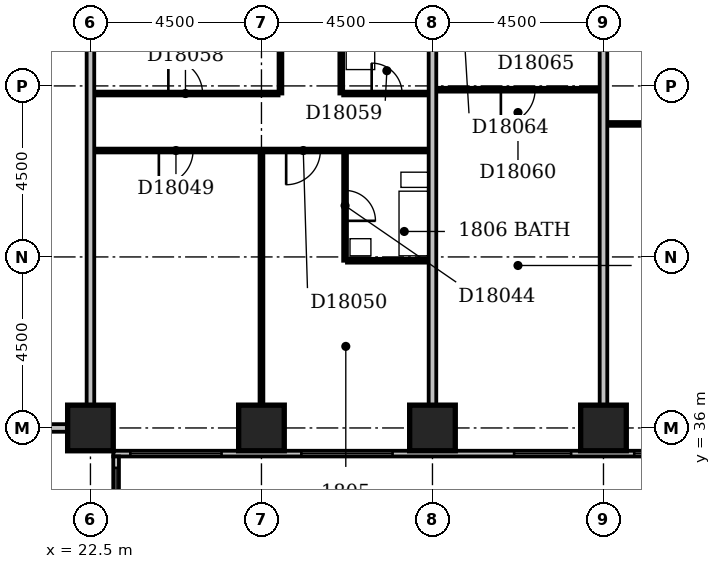
"""IFC4 building model, lengths in metres.
Left out: names, types, materials, properties, quantities, classifications, styles, units other than length and angle.
Written with IfcOpenShell. Run it as: python <this file> out.ifc"""

import sys

from ifc_helpers import new_model, si_unit, direction, frame, frame_2d, origin, origin_2d, place, context, subcontext, project, spatial, rectangle, extrude, element, fill, save


model = new_model("IFC4")
c1 = context("Model", 3, precision=1e-05, world=origin(), true_north=direction((0.0, 1.0)))
c2 = subcontext(c1, "Body", "Model", "MODEL_VIEW")
j1 = project(units=[si_unit("LENGTHUNIT", "METRE"), si_unit("PLANEANGLEUNIT", "RADIAN")], contexts=[c1])
p1 = place(None, origin())
s1 = spatial("IfcSite", under=j1, at=p1, CompositionType="ELEMENT")
p2 = place(p1, origin())
s2 = spatial("IfcBuilding", under=s1, at=p2, CompositionType="ELEMENT")
p3 = place(p2, frame((0.0, 0.0, 75.8)))
s3 = spatial("IfcBuildingStorey", under=s2, at=p3, CompositionType="ELEMENT", Elevation=75.8)
for number, where, z_axis, x_axis in (
    (1, (22.5, 36.0, -0.3), (0.0, 0.0, 1.0), (1.0, 0.0, 0.0)),
    (2, (27.0, 36.0, -0.3), (0.0, 0.0, 1.0), (1.0, 0.0, 0.0)),
    (3, (31.5, 36.0, -0.3), (0.0, 0.0, 1.0), (1.0, 0.0, 0.0)),
    (4, (36.0, 36.0, -0.3), (0.0, 0.0, 1.0), (1.0, 0.0, 0.0)),
):
    element("IfcColumn", number, at=place(p3, frame(where, z_axis=z_axis, x_axis=x_axis)), inside=s3, PredefinedType="COLUMN", context=c2, shape_type="SweptSolid", body=[
        extrude(rectangle(XDim=1.2, YDim=1.2, at=origin_2d()), origin(), (0.0, 0.0, 1.0), 3.6),
    ])
p4 = place(p3, frame((23.175, 17.4, 0.0), z_axis=(0.0, 0.0, 1.0), x_axis=(0.0, 1.0, 0.0)))
e5 = element("IfcWall", 5, at=p4, inside=s3, PredefinedType="STANDARD", context=c2, shape_type="SweptSolid", body=[
    extrude(rectangle(XDim=17.85, YDim=0.15, at=frame_2d((8.925, 0.0))), origin(), (0.0, 0.0, 1.0), 2.7),
])
p5 = place(p4, frame((1.65, 0.0, 0.6)))
e6 = element("IfcOpeningElement", 6, at=p5, cuts=e5, PredefinedType="OPENING", context=c2, shape_type="SweptSolid", body=[
    extrude(rectangle(XDim=2.4, YDim=1.8, at=frame_2d((1.2, 0.9))), frame((0.0, 0.087, 0.0), z_axis=(0.0, -1.0, 0.0), x_axis=(1.0, 0.0, 0.0)), (0.0, 0.0, 1.0), 0.174),
])
p6 = place(p4, frame((6.15, 0.0, 0.6)))
e7 = element("IfcOpeningElement", 7, at=p6, cuts=e5, PredefinedType="OPENING", context=c2, shape_type="SweptSolid", body=[
    extrude(rectangle(XDim=2.4, YDim=1.8, at=frame_2d((1.2, 0.9))), frame((0.0, 0.087, 0.0), z_axis=(0.0, -1.0, 0.0), x_axis=(1.0, 0.0, 0.0)), (0.0, 0.0, 1.0), 0.174),
])
p7 = place(p4, frame((10.483, 0.0, 0.6)))
e8 = element("IfcOpeningElement", 8, at=p7, cuts=e5, PredefinedType="OPENING", context=c2, shape_type="SweptSolid", body=[
    extrude(rectangle(XDim=1.5, YDim=1.8, at=frame_2d((0.75, 0.9))), frame((0.0, 0.087, 0.0), z_axis=(0.0, -1.0, 0.0), x_axis=(1.0, 0.0, 0.0)), (0.0, 0.0, 1.0), 0.174),
])
p8 = place(p4, frame((15.15, 0.0, 0.6)))
e9 = element("IfcOpeningElement", 9, at=p8, cuts=e5, PredefinedType="OPENING", context=c2, shape_type="SweptSolid", body=[
    extrude(rectangle(XDim=2.4, YDim=1.8, at=frame_2d((1.2, 0.9))), frame((0.0, 0.087, 0.0), z_axis=(0.0, -1.0, 0.0), x_axis=(1.0, 0.0, 0.0)), (0.0, 0.0, 1.0), 0.174),
])
p9 = place(p3, frame((23.1, 35.325, 0.0), z_axis=(0.0, 0.0, 1.0), x_axis=(1.0, 0.0, 0.0)))
e10 = element("IfcWall", 10, at=p9, inside=s3, PredefinedType="STANDARD", context=c2, shape_type="SweptSolid", body=[
    extrude(rectangle(XDim=45.15, YDim=0.15, at=frame_2d((22.575, 0.0))), origin(), (0.0, 0.0, 1.0), 2.7),
])
p10 = place(p9, frame((0.45, 0.0, 0.6)))
e11 = element("IfcOpeningElement", 11, at=p10, cuts=e10, PredefinedType="OPENING", context=c2, shape_type="SweptSolid", body=[
    extrude(rectangle(XDim=2.4, YDim=1.8, at=frame_2d((1.2, 0.9))), frame((0.0, 0.087, 0.0), z_axis=(0.0, -1.0, 0.0), x_axis=(1.0, 0.0, 0.0)), (0.0, 0.0, 1.0), 0.174),
])
p11 = place(p9, frame((4.95, 0.0, 0.6)))
e12 = element("IfcOpeningElement", 12, at=p11, cuts=e10, PredefinedType="OPENING", context=c2, shape_type="SweptSolid", body=[
    extrude(rectangle(XDim=2.4, YDim=1.8, at=frame_2d((1.2, 0.9))), frame((0.0, 0.087, 0.0), z_axis=(0.0, -1.0, 0.0), x_axis=(1.0, 0.0, 0.0)), (0.0, 0.0, 1.0), 0.174),
])
p12 = place(p9, frame((10.548, 0.0, 0.6)))
e13 = element("IfcOpeningElement", 13, at=p12, cuts=e10, PredefinedType="OPENING", context=c2, shape_type="SweptSolid", body=[
    extrude(rectangle(XDim=1.5, YDim=1.8, at=frame_2d((0.75, 0.9))), frame((0.0, 0.087, 0.0), z_axis=(0.0, -1.0, 0.0), x_axis=(1.0, 0.0, 0.0)), (0.0, 0.0, 1.0), 0.174),
])
p13 = place(p9, frame((13.71, 0.0, 0.6)))
e14 = element("IfcOpeningElement", 14, at=p13, cuts=e10, PredefinedType="OPENING", context=c2, shape_type="SweptSolid", body=[
    extrude(rectangle(XDim=1.8, YDim=1.8, at=frame_2d((0.9, 0.9))), frame((0.0, 0.087, 0.0), z_axis=(0.0, -1.0, 0.0), x_axis=(1.0, 0.0, 0.0)), (0.0, 0.0, 1.0), 0.174),
])
p14 = place(p9, frame((18.45, 0.0, 0.6)))
e15 = element("IfcOpeningElement", 15, at=p14, cuts=e10, PredefinedType="OPENING", context=c2, shape_type="SweptSolid", body=[
    extrude(rectangle(XDim=2.4, YDim=1.8, at=frame_2d((1.2, 0.9))), frame((0.0, 0.087, 0.0), z_axis=(0.0, -1.0, 0.0), x_axis=(1.0, 0.0, 0.0)), (0.0, 0.0, 1.0), 0.174),
])
p15 = place(p9, frame((22.95, 0.0, 0.6)))
e16 = element("IfcOpeningElement", 16, at=p15, cuts=e10, PredefinedType="OPENING", context=c2, shape_type="SweptSolid", body=[
    extrude(rectangle(XDim=2.4, YDim=1.8, at=frame_2d((1.2, 0.9))), frame((0.0, 0.087, 0.0), z_axis=(0.0, -1.0, 0.0), x_axis=(1.0, 0.0, 0.0)), (0.0, 0.0, 1.0), 0.174),
])
p16 = place(p9, frame((27.45, 0.0, 0.6)))
e17 = element("IfcOpeningElement", 17, at=p16, cuts=e10, PredefinedType="OPENING", context=c2, shape_type="SweptSolid", body=[
    extrude(rectangle(XDim=2.4, YDim=1.8, at=frame_2d((1.2, 0.9))), frame((0.0, 0.087, 0.0), z_axis=(0.0, -1.0, 0.0), x_axis=(1.0, 0.0, 0.0)), (0.0, 0.0, 1.0), 0.174),
])
p17 = place(p9, frame((31.95, 0.0, 0.6)))
e18 = element("IfcOpeningElement", 18, at=p17, cuts=e10, PredefinedType="OPENING", context=c2, shape_type="SweptSolid", body=[
    extrude(rectangle(XDim=2.4, YDim=1.8, at=frame_2d((1.2, 0.9))), frame((0.0, 0.087, 0.0), z_axis=(0.0, -1.0, 0.0), x_axis=(1.0, 0.0, 0.0)), (0.0, 0.0, 1.0), 0.174),
])
p18 = place(p9, frame((36.331, 0.0, 0.6)))
e19 = element("IfcOpeningElement", 19, at=p18, cuts=e10, PredefinedType="OPENING", context=c2, shape_type="SweptSolid", body=[
    extrude(rectangle(XDim=2.1, YDim=1.8, at=frame_2d((1.05, 0.9))), frame((0.0, 0.087, 0.0), z_axis=(0.0, -1.0, 0.0), x_axis=(1.0, 0.0, 0.0)), (0.0, 0.0, 1.0), 0.174),
])
p19 = place(p9, frame((40.95, 0.0, 0.6)))
e20 = element("IfcOpeningElement", 20, at=p19, cuts=e10, PredefinedType="OPENING", context=c2, shape_type="SweptSolid", body=[
    extrude(rectangle(XDim=2.4, YDim=1.8, at=frame_2d((1.2, 0.9))), frame((0.0, 0.087, 0.0), z_axis=(0.0, -1.0, 0.0), x_axis=(1.0, 0.0, 0.0)), (0.0, 0.0, 1.0), 0.174),
])
p20 = place(p3, frame((9.1, 36.0, 0.0), z_axis=(0.0, 0.0, 1.0), x_axis=(1.0, 0.0, 0.0)))
e21 = element("IfcWall", 21, at=p20, inside=s3, PredefinedType="PARTITIONING", context=c2, shape_type="SweptSolid", body=[
    extrude(rectangle(XDim=12.8, YDim=0.2, at=frame_2d((6.4, 0.0))), origin(), (0.0, 0.0, 1.0), 2.4),
])
p21 = place(p3, frame((22.5, 36.6, 0.0), z_axis=(0.0, 0.0, 1.0), x_axis=(0.0, 1.0, 0.0)))
e22 = element("IfcWall", 22, at=p21, inside=s3, PredefinedType="PARTITIONING", context=c2, shape_type="SweptSolid", body=[
    extrude(rectangle(XDim=12.8, YDim=0.2, at=frame_2d((6.4, 0.0))), origin(), (0.0, 0.0, 1.0), 3.3),
])
p22 = place(p3, frame((27.0, 36.6, 0.0), z_axis=(0.0, 0.0, 1.0), x_axis=(0.0, 1.0, 0.0)))
e23 = element("IfcWall", 23, at=p22, inside=s3, PredefinedType="PARTITIONING", context=c2, shape_type="SweptSolid", body=[
    extrude(rectangle(XDim=6.65, YDim=0.1, at=frame_2d((3.325, 0.0))), origin(), (0.0, 0.0, 1.0), 2.6),
])
p23 = place(p3, frame((31.5, 36.6, 0.0), z_axis=(0.0, 0.0, 1.0), x_axis=(0.0, 1.0, 0.0)))
e24 = element("IfcWall", 24, at=p23, inside=s3, PredefinedType="PARTITIONING", context=c2, shape_type="SweptSolid", body=[
    extrude(rectangle(XDim=12.8, YDim=0.2, at=frame_2d((6.4, 0.0))), origin(), (0.0, 0.0, 1.0), 3.3),
])
p24 = place(p3, frame((36.0, 36.6, 0.0), z_axis=(0.0, 0.0, 1.0), x_axis=(0.0, 1.0, 0.0)))
e25 = element("IfcWall", 25, at=p24, inside=s3, PredefinedType="PARTITIONING", context=c2, shape_type="SweptSolid", body=[
    extrude(rectangle(XDim=12.8, YDim=0.2, at=frame_2d((6.4, 0.0))), origin(), (0.0, 0.0, 1.0), 2.4),
])
p25 = place(p3, frame((29.2, 40.4, 0.0), z_axis=(0.0, 0.0, 1.0), x_axis=(0.0, 1.0, 0.0)))
e26 = element("IfcWall", 26, at=p25, inside=s3, PredefinedType="PLUMBINGWALL", context=c2, shape_type="SweptSolid", body=[
    extrude(rectangle(XDim=2.85, YDim=0.1, at=frame_2d((1.425, 0.0))), origin(), (0.0, 0.0, 1.0), 3.3),
])
p26 = place(p25, frame((1.05, 0.0, 0.0)))
e27 = element("IfcOpeningElement", 27, at=p26, cuts=e26, PredefinedType="OPENING", context=c2, shape_type="SweptSolid", body=[
    extrude(rectangle(XDim=0.8, YDim=2.1, at=frame_2d((0.4, 1.05))), frame((0.0, 0.062, 0.0), z_axis=(0.0, -1.0, 0.0), x_axis=(1.0, 0.0, 0.0)), (0.0, 0.0, 1.0), 0.124),
])
p27 = place(p3, frame((29.25, 40.4, 0.0), z_axis=(0.0, 0.0, 1.0), x_axis=(1.0, 0.0, 0.0)))
e28 = element("IfcWall", 28, at=p27, inside=s3, PredefinedType="PLUMBINGWALL", context=c2, shape_type="SweptSolid", body=[
    extrude(rectangle(XDim=2.15, YDim=0.1, at=frame_2d((1.075, 0.0))), origin(), (0.0, 0.0, 1.0), 3.3),
])
p28 = place(p3, frame((22.6, 43.3, 0.0), z_axis=(0.0, 0.0, 1.0), x_axis=(1.0, 0.0, 0.0)))
e29 = element("IfcWall", 29, at=p28, inside=s3, PredefinedType="PARTITIONING", context=c2, shape_type="SweptSolid", body=[
    extrude(rectangle(XDim=8.8, YDim=0.1, at=frame_2d((4.4, 0.0))), origin(), (0.0, 0.0, 1.0), 3.3),
])
p29 = place(p28, frame((1.7, 0.0, 0.0)))
e30 = element("IfcOpeningElement", 30, at=p29, cuts=e29, PredefinedType="OPENING", context=c2, shape_type="SweptSolid", body=[
    extrude(rectangle(XDim=0.9, YDim=2.1, at=frame_2d((0.45, 1.05))), frame((0.0, 0.062, 0.0), z_axis=(0.0, -1.0, 0.0), x_axis=(1.0, 0.0, 0.0)), (0.0, 0.0, 1.0), 0.124),
])
p30 = place(p28, frame((5.05, 0.0, 0.0)))
e31 = element("IfcOpeningElement", 31, at=p30, cuts=e29, PredefinedType="OPENING", context=c2, shape_type="SweptSolid", body=[
    extrude(rectangle(XDim=0.9, YDim=2.1, at=frame_2d((0.45, 1.05))), frame((0.0, 0.062, 0.0), z_axis=(0.0, -1.0, 0.0), x_axis=(1.0, 0.0, 0.0)), (0.0, 0.0, 1.0), 0.124),
])
p31 = place(p3, frame((36.1, 44.0, 0.0), z_axis=(0.0, 0.0, 1.0), x_axis=(1.0, 0.0, 0.0)))
e32 = element("IfcWall", 32, at=p31, inside=s3, PredefinedType="PARTITIONING", context=c2, shape_type="SweptSolid", body=[
    extrude(rectangle(XDim=13.3, YDim=0.1, at=frame_2d((6.65, 0.0))), origin(), (0.0, 0.0, 1.0), 3.3),
])
p32 = place(p31, frame((3.9, 0.0, 0.0)))
e33 = element("IfcOpeningElement", 33, at=p32, cuts=e32, PredefinedType="OPENING", context=c2, shape_type="SweptSolid", body=[
    extrude(rectangle(XDim=0.9, YDim=2.1, at=frame_2d((0.45, 1.05))), frame((0.0, 0.062, 0.0), z_axis=(0.0, -1.0, 0.0), x_axis=(1.0, 0.0, 0.0)), (0.0, 0.0, 1.0), 0.124),
])
p33 = place(p31, frame((10.7, 0.0, 0.0)))
e34 = element("IfcOpeningElement", 34, at=p33, cuts=e32, PredefinedType="OPENING", context=c2, shape_type="SweptSolid", body=[
    extrude(rectangle(XDim=0.9, YDim=2.1, at=frame_2d((0.45, 1.05))), frame((0.0, 0.062, 0.0), z_axis=(0.0, -1.0, 0.0), x_axis=(1.0, 0.0, 0.0)), (0.0, 0.0, 1.0), 0.124),
])
p34 = place(p3, frame((22.6, 44.8, 0.0), z_axis=(0.0, 0.0, 1.0), x_axis=(1.0, 0.0, 0.0)))
e35 = element("IfcWall", 35, at=p34, inside=s3, PredefinedType="PARTITIONING", context=c2, shape_type="SweptSolid", body=[
    extrude(rectangle(XDim=4.85, YDim=0.1, at=frame_2d((2.425, 0.0))), origin(), (0.0, 0.0, 1.0), 3.3),
])
p35 = place(p34, frame((1.95, 0.0, 0.0)))
e36 = element("IfcOpeningElement", 36, at=p35, cuts=e35, PredefinedType="OPENING", context=c2, shape_type="SweptSolid", body=[
    extrude(rectangle(XDim=0.9, YDim=2.1, at=frame_2d((0.45, 1.05))), frame((0.0, 0.062, 0.0), z_axis=(0.0, -1.0, 0.0), x_axis=(1.0, 0.0, 0.0)), (0.0, 0.0, 1.0), 0.124),
])
p36 = place(p3, frame((27.5, 44.8, 0.0), z_axis=(0.0, 0.0, 1.0), x_axis=(0.0, 1.0, 0.0)))
e37 = element("IfcWall", 37, at=p36, inside=s3, PredefinedType="PARTITIONING", context=c2, shape_type="SweptSolid", body=[
    extrude(rectangle(XDim=4.6, YDim=0.1, at=frame_2d((2.3, 0.0))), origin(), (0.0, 0.0, 1.0), 2.6),
])
p37 = place(p3, frame((29.1, 44.8, 0.0), z_axis=(0.0, 0.0, 1.0), x_axis=(0.0, 1.0, 0.0)))
e38 = element("IfcWall", 38, at=p37, inside=s3, PredefinedType="PLUMBINGWALL", context=c2, shape_type="SweptSolid", body=[
    extrude(rectangle(XDim=4.6, YDim=0.1, at=frame_2d((2.3, 0.0))), origin(), (0.0, 0.0, 1.0), 3.3),
])
p38 = place(p3, frame((29.15, 44.8, 0.0), z_axis=(0.0, 0.0, 1.0), x_axis=(1.0, 0.0, 0.0)))
e39 = element("IfcWall", 39, at=p38, inside=s3, PredefinedType="PARTITIONING", context=c2, shape_type="SweptSolid", body=[
    extrude(rectangle(XDim=2.25, YDim=0.1, at=frame_2d((1.125, 0.0))), origin(), (0.0, 0.0, 1.0), 3.3),
])
p39 = place(p38, frame((0.75, 0.0, 0.0)))
e40 = element("IfcOpeningElement", 40, at=p39, cuts=e39, PredefinedType="OPENING", context=c2, shape_type="SweptSolid", body=[
    extrude(rectangle(XDim=0.8, YDim=2.1, at=frame_2d((0.4, 1.05))), frame((0.0, 0.062, 0.0), z_axis=(0.0, -1.0, 0.0), x_axis=(1.0, 0.0, 0.0)), (0.0, 0.0, 1.0), 0.124),
])
p40 = place(p3, frame((31.6, 44.9, 0.0), z_axis=(0.0, 0.0, 1.0), x_axis=(1.0, 0.0, 0.0)))
e41 = element("IfcWall", 41, at=p40, inside=s3, PredefinedType="PARTITIONING", context=c2, shape_type="SweptSolid", body=[
    extrude(rectangle(XDim=4.3, YDim=0.1, at=frame_2d((2.15, 0.0))), origin(), (0.0, 0.0, 1.0), 3.3),
])
p41 = place(p40, frame((1.7, 0.0, 0.0)))
e42 = element("IfcOpeningElement", 42, at=p41, cuts=e41, PredefinedType="OPENING", context=c2, shape_type="SweptSolid", body=[
    extrude(rectangle(XDim=0.9, YDim=2.1, at=frame_2d((0.45, 1.05))), frame((0.0, 0.062, 0.0), z_axis=(0.0, -1.0, 0.0), x_axis=(1.0, 0.0, 0.0)), (0.0, 0.0, 1.0), 0.124),
])
p42 = place(p8, origin())
e43 = element("IfcWindow", 43, at=p42, inside=s3, PartitioningType="SINGLE_PANEL", PredefinedType="WINDOW", context=c2, shape_type="SweptSolid", body=[
    extrude(rectangle(XDim=2.4, YDim=1.8, at=frame_2d((1.2, 0.9))), frame((0.0, 0.03, 0.0), z_axis=(0.0, -1.0, 0.0), x_axis=(1.0, 0.0, 0.0)), (0.0, 0.0, 1.0), 0.06),
])
fill(e9, e43)
p43 = place(p10, origin())
e44 = element("IfcWindow", 44, at=p43, inside=s3, PartitioningType="SINGLE_PANEL", PredefinedType="WINDOW", context=c2, shape_type="SweptSolid", body=[
    extrude(rectangle(XDim=2.4, YDim=1.8, at=frame_2d((1.2, 0.9))), frame((0.0, 0.03, 0.0), z_axis=(0.0, -1.0, 0.0), x_axis=(1.0, 0.0, 0.0)), (0.0, 0.0, 1.0), 0.06),
])
fill(e11, e44)
p44 = place(p11, origin())
e45 = element("IfcWindow", 45, at=p44, inside=s3, PartitioningType="SINGLE_PANEL", PredefinedType="WINDOW", context=c2, shape_type="SweptSolid", body=[
    extrude(rectangle(XDim=2.4, YDim=1.8, at=frame_2d((1.2, 0.9))), frame((0.0, 0.03, 0.0), z_axis=(0.0, -1.0, 0.0), x_axis=(1.0, 0.0, 0.0)), (0.0, 0.0, 1.0), 0.06),
])
fill(e12, e45)
p45 = place(p12, origin())
e46 = element("IfcWindow", 46, at=p45, inside=s3, PartitioningType="SINGLE_PANEL", PredefinedType="WINDOW", context=c2, shape_type="SweptSolid", body=[
    extrude(rectangle(XDim=1.5, YDim=1.8, at=frame_2d((0.75, 0.9))), frame((0.0, 0.03, 0.0), z_axis=(0.0, -1.0, 0.0), x_axis=(1.0, 0.0, 0.0)), (0.0, 0.0, 1.0), 0.06),
])
fill(e13, e46)
p46 = place(p13, origin())
e47 = element("IfcWindow", 47, at=p46, inside=s3, PartitioningType="SINGLE_PANEL", PredefinedType="WINDOW", context=c2, shape_type="SweptSolid", body=[
    extrude(rectangle(XDim=1.8, YDim=1.8, at=frame_2d((0.9, 0.9))), frame((0.0, 0.03, 0.0), z_axis=(0.0, -1.0, 0.0), x_axis=(1.0, 0.0, 0.0)), (0.0, 0.0, 1.0), 0.06),
])
fill(e14, e47)
p47 = place(p26, frame((0.8, 0.0, 0.0), z_axis=(0.0, 0.0, 1.0), x_axis=(-1.0, 0.0, 0.0)))
e48 = element("IfcDoor", 48, at=p47, inside=s3, OperationType="SINGLE_SWING_RIGHT", PredefinedType="DOOR", context=c2, shape_type="SweptSolid", body=[
    extrude(rectangle(XDim=0.8, YDim=2.1, at=frame_2d((0.4, 1.05))), frame((0.0, 0.025, 0.0), z_axis=(0.0, -1.0, 0.0), x_axis=(1.0, 0.0, 0.0)), (0.0, 0.0, 1.0), 0.05),
])
fill(e27, e48)
p48 = place(p29, frame((0.9, 0.0, 0.0), z_axis=(0.0, 0.0, 1.0), x_axis=(-1.0, 0.0, 0.0)))
e49 = element("IfcDoor", 49, at=p48, inside=s3, OperationType="SINGLE_SWING_RIGHT", PredefinedType="DOOR", context=c2, shape_type="SweptSolid", body=[
    extrude(rectangle(XDim=0.9, YDim=2.1, at=frame_2d((0.45, 1.05))), frame((0.0, 0.025, 0.0), z_axis=(0.0, -1.0, 0.0), x_axis=(1.0, 0.0, 0.0)), (0.0, 0.0, 1.0), 0.05),
])
fill(e30, e49)
p49 = place(p30, frame((0.9, 0.0, 0.0), z_axis=(0.0, 0.0, 1.0), x_axis=(-1.0, 0.0, 0.0)))
e50 = element("IfcDoor", 50, at=p49, inside=s3, OperationType="SINGLE_SWING_RIGHT", PredefinedType="DOOR", context=c2, shape_type="SweptSolid", body=[
    extrude(rectangle(XDim=0.9, YDim=2.1, at=frame_2d((0.45, 1.05))), frame((0.0, 0.025, 0.0), z_axis=(0.0, -1.0, 0.0), x_axis=(1.0, 0.0, 0.0)), (0.0, 0.0, 1.0), 0.05),
])
fill(e31, e50)
p50 = place(p35, origin())
e51 = element("IfcDoor", 51, at=p50, inside=s3, OperationType="SINGLE_SWING_LEFT", PredefinedType="DOOR", context=c2, shape_type="SweptSolid", body=[
    extrude(rectangle(XDim=0.9, YDim=2.1, at=frame_2d((0.45, 1.05))), frame((0.0, 0.025, 0.0), z_axis=(0.0, -1.0, 0.0), x_axis=(1.0, 0.0, 0.0)), (0.0, 0.0, 1.0), 0.05),
])
fill(e36, e51)
p51 = place(p39, origin())
e52 = element("IfcDoor", 52, at=p51, inside=s3, OperationType="SINGLE_SWING_LEFT", PredefinedType="DOOR", context=c2, shape_type="SweptSolid", body=[
    extrude(rectangle(XDim=0.8, YDim=2.1, at=frame_2d((0.4, 1.05))), frame((0.0, 0.025, 0.0), z_axis=(0.0, -1.0, 0.0), x_axis=(1.0, 0.0, 0.0)), (0.0, 0.0, 1.0), 0.05),
])
fill(e40, e52)
p52 = place(p41, frame((0.9, 0.0, 0.0), z_axis=(0.0, 0.0, 1.0), x_axis=(-1.0, 0.0, 0.0)))
e53 = element("IfcDoor", 53, at=p52, inside=s3, OperationType="SINGLE_SWING_RIGHT", PredefinedType="DOOR", context=c2, shape_type="SweptSolid", body=[
    extrude(rectangle(XDim=0.9, YDim=2.1, at=frame_2d((0.45, 1.05))), frame((0.0, 0.025, 0.0), z_axis=(0.0, -1.0, 0.0), x_axis=(1.0, 0.0, 0.0)), (0.0, 0.0, 1.0), 0.05),
])
fill(e42, e53)
save(model, sys.argv[1])
